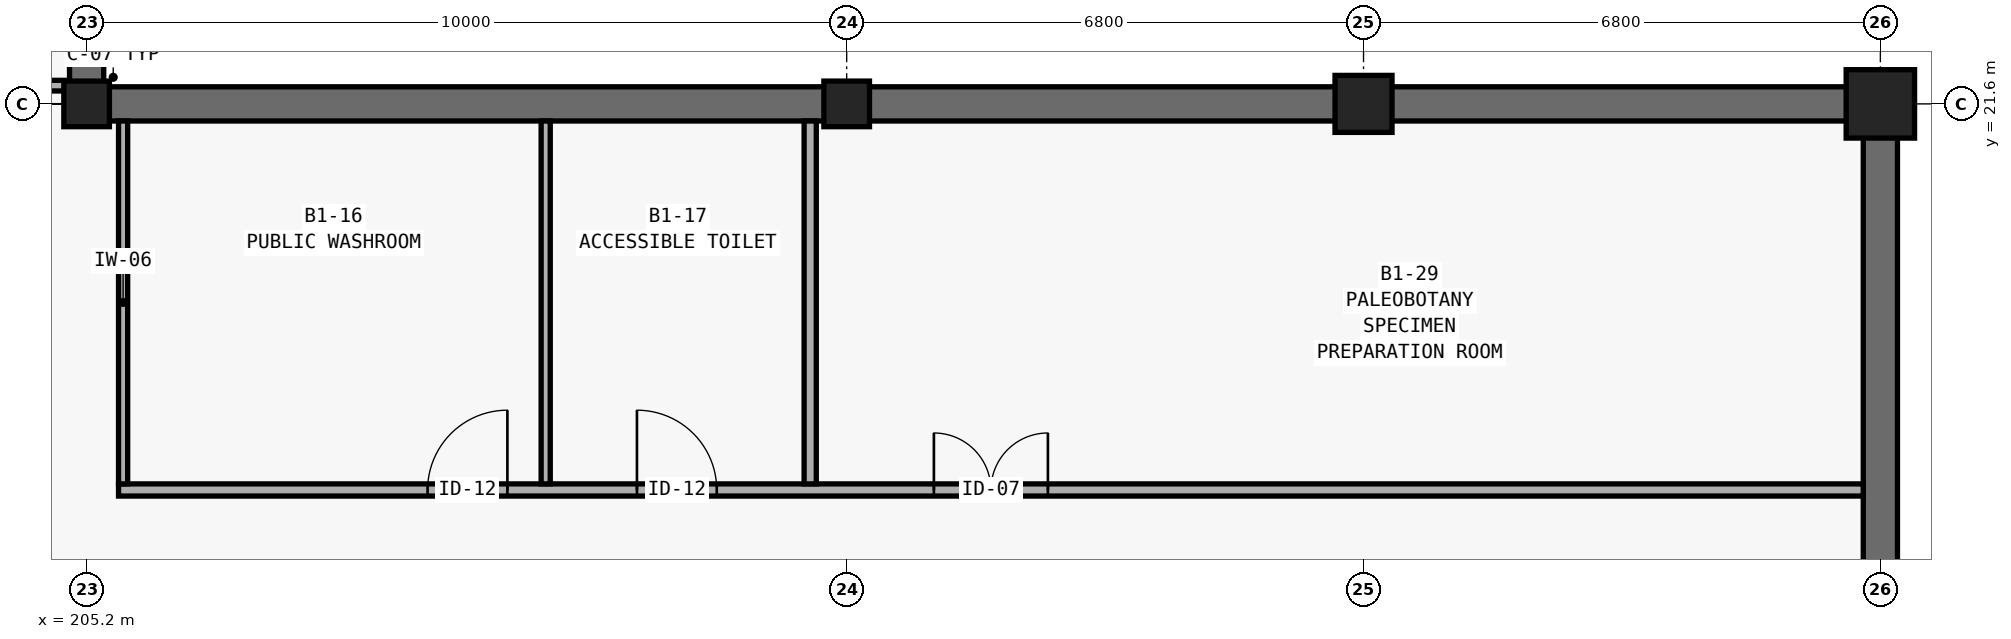
"""IFC4 building model, lengths in metres.
Left out: names, types, materials, properties, quantities, classifications, styles, units other than length and angle.
Written with IfcOpenShell. Run it as: python <this file> out.ifc"""

import sys

from ifc_helpers import new_model, si_unit, direction, frame, frame_2d, origin, origin_2d, place, context, subcontext, project, spatial, rectangle, extrude, element, fill, save


model = new_model("IFC4")
c1 = context("Model", 3, precision=1e-05, world=origin(), true_north=direction((0.0, 1.0)))
c2 = subcontext(c1, "Body", "Model", "MODEL_VIEW")
j1 = project(units=[si_unit("LENGTHUNIT", "METRE"), si_unit("PLANEANGLEUNIT", "RADIAN")], contexts=[c1])
p1 = place(None, origin())
s1 = spatial("IfcSite", under=j1, at=p1, CompositionType="ELEMENT")
p2 = place(p1, origin())
s2 = spatial("IfcBuilding", under=s1, at=p2, CompositionType="ELEMENT")
p3 = place(p2, frame((0.0, 0.0, -4.8)))
s3 = spatial("IfcBuildingStorey", under=s2, at=p3, CompositionType="ELEMENT", Elevation=-4.8)
for number, where, z_axis, x_axis in (
    (1, (205.2, 21.6, 0.0), (0.0, 0.0, 1.0), (1.0, 0.0, 0.0)),
    (2, (215.2, 21.6, 0.0), (0.0, 0.0, 1.0), (1.0, 0.0, 0.0)),
):
    element("IfcColumn", number, at=place(p3, frame(where, z_axis=z_axis, x_axis=x_axis)), inside=s3, PredefinedType="COLUMN", context=c2, shape_type="SweptSolid", body=[
        extrude(rectangle(XDim=0.6, YDim=0.6, at=origin_2d()), origin(), (0.0, 0.0, 1.0), 4.8),
    ])
p4 = place(p3, frame((222.0, 21.6, 0.0), z_axis=(0.0, 0.0, 1.0), x_axis=(1.0, 0.0, 0.0)))
e3 = element("IfcColumn", 3, at=p4, inside=s3, PredefinedType="COLUMN", context=c2, shape_type="SweptSolid", body=[
    extrude(rectangle(XDim=0.75, YDim=0.75, at=origin_2d()), origin(), (0.0, 0.0, 1.0), 4.8),
])
p5 = place(p3, frame((228.8, 21.6, 0.0), z_axis=(0.0, 0.0, 1.0), x_axis=(1.0, 0.0, 0.0)))
e4 = element("IfcColumn", 4, at=p5, inside=s3, PredefinedType="COLUMN", context=c2, shape_type="SweptSolid", body=[
    extrude(rectangle(XDim=0.9, YDim=0.9, at=origin_2d()), origin(), (0.0, 0.0, 1.0), 4.8),
])
p6 = place(p3, frame((228.8, 9.6, 0.0), z_axis=(0.0, 0.0, 1.0), x_axis=(0.0, 1.0, 0.0)))
e5 = element("IfcWall", 5, at=p6, inside=s3, PredefinedType="SHEAR", context=c2, shape_type="SweptSolid", body=[
    extrude(rectangle(XDim=12.0, YDim=0.45, at=frame_2d((6.0, 0.0))), origin(), (0.0, 0.0, 1.0), 4.8),
])
for number, where, z_axis, x_axis in (
    (6, (228.8, 21.6, 0.0), (0.0, 0.0, 1.0), (-1.0, 0.0, 0.0)),
    (7, (222.0, 21.6, 0.0), (0.0, 0.0, 1.0), (-1.0, 0.0, 0.0)),
):
    element("IfcWall", number, at=place(p3, frame(where, z_axis=z_axis, x_axis=x_axis)), inside=s3, PredefinedType="SHEAR", context=c2, shape_type="SweptSolid", body=[
        extrude(rectangle(XDim=6.8, YDim=0.45, at=frame_2d((3.4, 0.0))), origin(), (0.0, 0.0, 1.0), 4.8),
    ])
p7 = place(p3, frame((215.2, 21.6, 0.0), z_axis=(0.0, 0.0, 1.0), x_axis=(-1.0, 0.0, 0.0)))
e8 = element("IfcWall", 8, at=p7, inside=s3, PredefinedType="SHEAR", context=c2, shape_type="SweptSolid", body=[
    extrude(rectangle(XDim=10.0, YDim=0.45, at=frame_2d((5.0, 0.0))), origin(), (0.0, 0.0, 1.0), 4.8),
])
p8 = place(p3, frame((205.2, 21.6, 0.0), z_axis=(0.0, 0.0, 1.0), x_axis=(0.0, 1.0, 0.0)))
e9 = element("IfcWall", 9, at=p8, inside=s3, PredefinedType="SHEAR", context=c2, shape_type="SweptSolid", body=[
    extrude(rectangle(XDim=8.4, YDim=0.45, at=frame_2d((4.2, 0.0))), origin(), (0.0, 0.0, 1.0), 4.8),
])
p9 = place(p3, frame((205.62, 16.52, 0.0), z_axis=(0.0, 0.0, 1.0), x_axis=(1.0, 0.0, 0.0)))
e10 = element("IfcWall", 10, at=p9, inside=s3, PredefinedType="PARTITIONING", context=c2, shape_type="SweptSolid", body=[
    extrude(rectangle(XDim=22.955, YDim=0.16, at=frame_2d((11.478, 0.0))), origin(), (0.0, 0.0, 1.0), 3.26),
])
p10 = place(p9, frame((4.066, 0.0, 0.0)))
e11 = element("IfcOpeningElement", 11, at=p10, cuts=e10, PredefinedType="OPENING", context=c2, shape_type="SweptSolid", body=[
    extrude(rectangle(XDim=1.05, YDim=2.1, at=frame_2d((0.525, 1.05))), frame((0.0, 0.095, 0.0), z_axis=(0.0, -1.0, 0.0), x_axis=(1.0, 0.0, 0.0)), (0.0, 0.0, 1.0), 0.19),
])
p11 = place(p9, frame((6.821, 0.0, 0.0)))
e12 = element("IfcOpeningElement", 12, at=p11, cuts=e10, PredefinedType="OPENING", context=c2, shape_type="SweptSolid", body=[
    extrude(rectangle(XDim=1.05, YDim=2.1, at=frame_2d((0.525, 1.05))), frame((0.0, 0.095, 0.0), z_axis=(0.0, -1.0, 0.0), x_axis=(1.0, 0.0, 0.0)), (0.0, 0.0, 1.0), 0.19),
])
p12 = place(p9, frame((10.728, 0.0, 0.0)))
e13 = element("IfcOpeningElement", 13, at=p12, cuts=e10, PredefinedType="OPENING", context=c2, shape_type="SweptSolid", body=[
    extrude(rectangle(XDim=1.5, YDim=2.2, at=frame_2d((0.75, 1.1))), frame((0.0, 0.095, 0.0), z_axis=(0.0, -1.0, 0.0), x_axis=(1.0, 0.0, 0.0)), (0.0, 0.0, 1.0), 0.19),
])
p13 = place(p3, frame((195.5, 21.84, 0.0), z_axis=(0.0, 0.0, 1.0), x_axis=(1.0, 0.0, 0.0)))
e14 = element("IfcWall", 14, at=p13, inside=s3, PredefinedType="PARTITIONING", context=c2, shape_type="SweptSolid", body=[
    extrude(rectangle(XDim=9.475, YDim=0.14, at=frame_2d((4.738, 0.0))), origin(), (0.0, 0.0, 1.0), 3.26),
])
for number, where, z_axis, x_axis in (
    (15, (205.68, 16.6, 0.0), (0.0, 0.0, 1.0), (0.0, 1.0, 0.0)),
    (16, (211.24, 16.6, 0.0), (0.0, 0.0, 1.0), (0.0, 1.0, 0.0)),
):
    element("IfcWall", number, at=place(p3, frame(where, z_axis=z_axis, x_axis=x_axis)), inside=s3, PredefinedType="PARTITIONING", context=c2, shape_type="SweptSolid", body=[
        extrude(rectangle(XDim=4.775, YDim=0.12, at=frame_2d((2.387, 0.0))), origin(), (0.0, 0.0, 1.0), 3.26),
    ])
p14 = place(p3, frame((214.72, 16.6, 0.0), z_axis=(0.0, 0.0, 1.0), x_axis=(0.0, 1.0, 0.0)))
e17 = element("IfcWall", 17, at=p14, inside=s3, PredefinedType="PARTITIONING", context=c2, shape_type="SweptSolid", body=[
    extrude(rectangle(XDim=4.775, YDim=0.16, at=frame_2d((2.387, 0.0))), origin(), (0.0, 0.0, 1.0), 3.26),
])
p15 = place(p10, origin())
e18 = element("IfcDoor", 18, at=p15, inside=s3, OperationType="SINGLE_SWING_RIGHT", PredefinedType="DOOR", context=c2, shape_type="SweptSolid", body=[
    extrude(rectangle(XDim=1.05, YDim=2.1, at=frame_2d((0.525, 1.05))), frame((0.0, 0.025, 0.0), z_axis=(0.0, -1.0, 0.0), x_axis=(1.0, 0.0, 0.0)), (0.0, 0.0, 1.0), 0.05),
])
fill(e11, e18)
p16 = place(p11, origin())
e19 = element("IfcDoor", 19, at=p16, inside=s3, OperationType="SINGLE_SWING_LEFT", PredefinedType="DOOR", context=c2, shape_type="SweptSolid", body=[
    extrude(rectangle(XDim=1.05, YDim=2.1, at=frame_2d((0.525, 1.05))), frame((0.0, 0.025, 0.0), z_axis=(0.0, -1.0, 0.0), x_axis=(1.0, 0.0, 0.0)), (0.0, 0.0, 1.0), 0.05),
])
fill(e12, e19)
p17 = place(p12, origin())
e20 = element("IfcDoor", 20, at=p17, inside=s3, OperationType="DOUBLE_DOOR_SINGLE_SWING", PredefinedType="DOOR", context=c2, shape_type="SweptSolid", body=[
    extrude(rectangle(XDim=1.5, YDim=2.2, at=frame_2d((0.75, 1.1))), frame((0.0, 0.025, 0.0), z_axis=(0.0, -1.0, 0.0), x_axis=(1.0, 0.0, 0.0)), (0.0, 0.0, 1.0), 0.05),
])
fill(e13, e20)
save(model, sys.argv[1])
